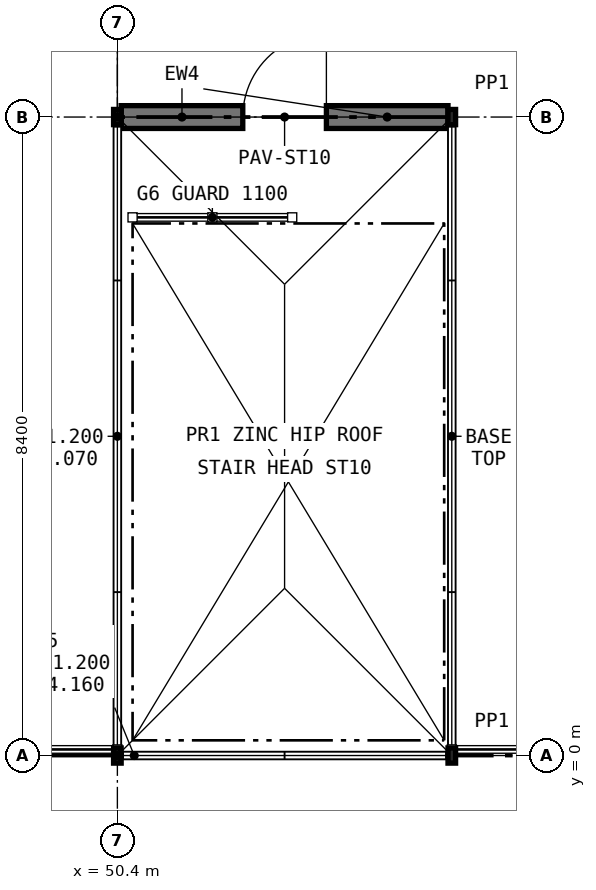
"""IFC4 building model, lengths in metres.
Left out: names, types, materials, properties, quantities, classifications, styles, units other than length and angle.
Written with IfcOpenShell. Run it as: python <this file> out.ifc"""

import sys

from ifc_helpers import new_model, si_unit, direction, frame, frame_2d, origin, origin_2d, place, context, subcontext, project, spatial, rectangle, hollow_rectangle, extrude, element, fill, save


model = new_model("IFC4")
c1 = context("Model", 3, precision=1e-05, world=origin(), true_north=direction((0.0, 1.0)))
c2 = subcontext(c1, "Body", "Model", "MODEL_VIEW")
j1 = project(units=[si_unit("LENGTHUNIT", "METRE"), si_unit("PLANEANGLEUNIT", "RADIAN")], contexts=[c1])
p1 = place(None, origin())
s1 = spatial("IfcSite", under=j1, at=p1, CompositionType="ELEMENT")
p2 = place(p1, origin())
s2 = spatial("IfcBuilding", under=s1, at=p2, CompositionType="ELEMENT")
p3 = place(p2, frame((0.0, 0.0, 31.2)))
s3 = spatial("IfcBuildingStorey", under=s2, at=p3, CompositionType="ELEMENT", Elevation=31.2)
p4 = place(p3, frame((50.4, 0.0, 0.0), z_axis=(0.0, 0.0, 1.0), x_axis=(1.0, 0.0, 0.0)))
e1 = element("IfcColumn", 1, at=p4, inside=s3, PredefinedType="COLUMN", context=c2, shape_type="SweptSolid", body=[
    extrude(hollow_rectangle(XDim=0.1, YDim=0.2, WallThickness=0.008, at=origin_2d()), origin(), (0.0, 0.0, 1.0), 3.2),
])
p5 = place(p3, frame((54.8, 0.0, -0.2), z_axis=(0.0, 0.0, 1.0), x_axis=(1.0, 0.0, 0.0)))
e2 = element("IfcColumn", 2, at=p5, inside=s3, PredefinedType="COLUMN", context=c2, shape_type="SweptSolid", body=[
    extrude(hollow_rectangle(XDim=0.1, YDim=0.2, WallThickness=0.008, at=origin_2d()), origin(), (0.0, 0.0, 1.0), 3.4),
])
p6 = place(p3, frame((50.4, 8.4, 0.0), z_axis=(0.0, 0.0, 1.0), x_axis=(1.0, 0.0, 0.0)))
e3 = element("IfcColumn", 3, at=p6, inside=s3, PredefinedType="COLUMN", context=c2, shape_type="SweptSolid", body=[
    extrude(hollow_rectangle(XDim=0.1, YDim=0.2, WallThickness=0.008, at=origin_2d()), origin(), (0.0, 0.0, 1.0), 3.2),
])
p7 = place(p3, frame((54.8, 8.4, -0.2), z_axis=(0.0, 0.0, 1.0), x_axis=(1.0, 0.0, 0.0)))
e4 = element("IfcColumn", 4, at=p7, inside=s3, PredefinedType="COLUMN", context=c2, shape_type="SweptSolid", body=[
    extrude(hollow_rectangle(XDim=0.1, YDim=0.2, WallThickness=0.008, at=origin_2d()), origin(), (0.0, 0.0, 1.0), 3.4),
])
p8 = place(p3, frame((50.45, 8.4, 0.0), z_axis=(0.0, 0.0, 1.0), x_axis=(1.0, 0.0, 0.0)))
e5 = element("IfcWall", 5, at=p8, inside=s3, PredefinedType="STANDARD", context=c2, shape_type="SweptSolid", body=[
    extrude(rectangle(XDim=4.3, YDim=0.3, at=frame_2d((2.15, 0.0))), origin(), (0.0, 0.0, 1.0), 3.2),
])
p9 = place(p8, frame((1.6, 0.0, 0.0)))
e6 = element("IfcOpeningElement", 6, at=p9, cuts=e5, PredefinedType="OPENING", context=c2, shape_type="SweptSolid", body=[
    extrude(rectangle(XDim=1.1, YDim=2.1, at=frame_2d((0.55, 1.05))), frame((0.0, 0.16, 0.0), z_axis=(0.0, -1.0, 0.0), x_axis=(1.0, 0.0, 0.0)), (0.0, 0.0, 1.0), 0.32),
])
p10 = place(p9, origin())
e7 = element("IfcDoor", 7, at=p10, inside=s3, OperationType="SINGLE_SWING_RIGHT", PredefinedType="DOOR", context=c2, shape_type="SweptSolid", body=[
    extrude(rectangle(XDim=1.1, YDim=2.1, at=frame_2d((0.55, 1.05))), frame((0.0, 0.025, 0.0), z_axis=(0.0, -1.0, 0.0), x_axis=(1.0, 0.0, 0.0)), (0.0, 0.0, 1.0), 0.05),
])
fill(e6, e7)
save(model, sys.argv[1])
